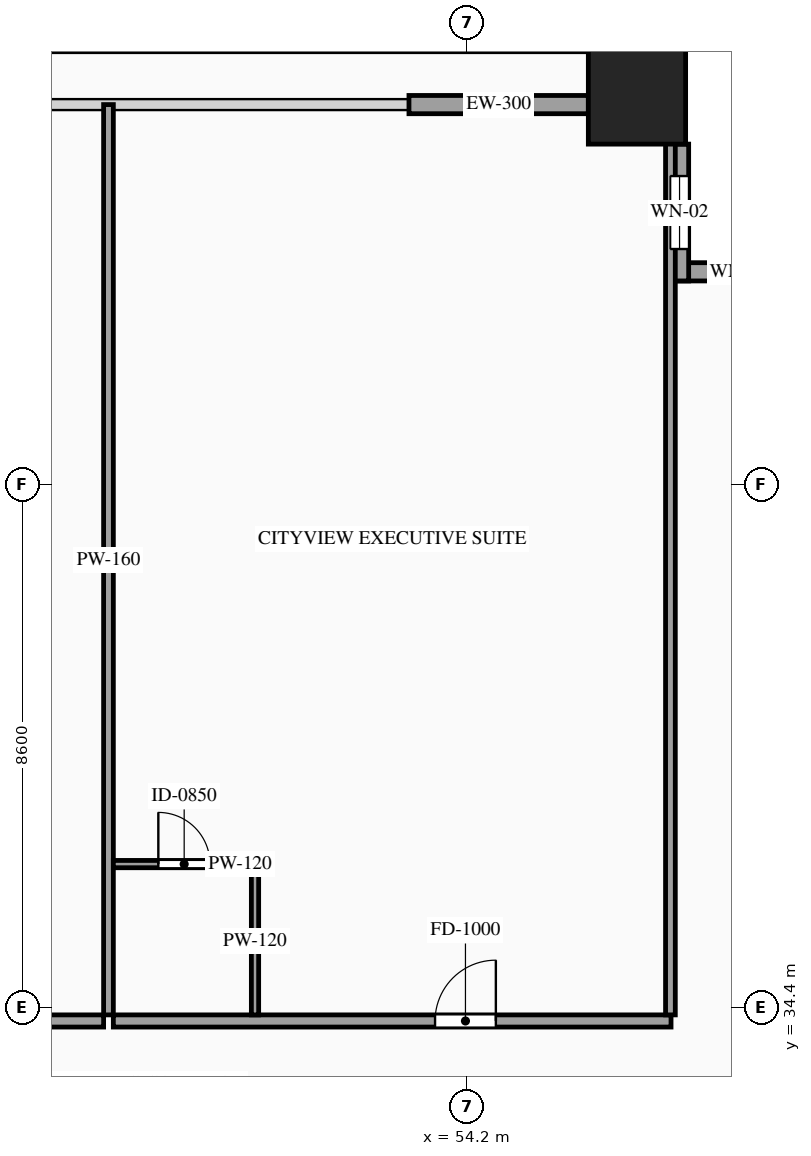
"""IFC4 building model, lengths in metres.
Left out: names, types, materials, properties, quantities, classifications, styles, units other than length and angle.
Written with IfcOpenShell. Run it as: python <this file> out.ifc"""

import sys

from ifc_helpers import new_model, si_unit, direction, frame, frame_2d, origin, origin_2d, place, context, subcontext, project, spatial, rectangle, hollow_rectangle, extrude, source, transform, mapped, element, fill, save


model = new_model("IFC4")
c1 = context("Model", 3, precision=1e-05, world=origin(), true_north=direction((0.0, 1.0)))
c2 = subcontext(c1, "Body", "Model", "MODEL_VIEW")
j1 = project(units=[si_unit("LENGTHUNIT", "METRE"), si_unit("PLANEANGLEUNIT", "RADIAN")], contexts=[c1])
p1 = place(None, origin())
s1 = spatial("IfcSite", under=j1, at=p1, CompositionType="ELEMENT")
p2 = place(p1, origin())
s2 = spatial("IfcBuilding", under=s1, at=p2, CompositionType="ELEMENT")
p3 = place(p2, frame((0.0, 0.0, 101.0)))
s3 = spatial("IfcBuildingStorey", under=s2, at=p3, CompositionType="ELEMENT", Elevation=101.0)
m1 = source(origin(), c2, "Body", "SweptSolid", [
    extrude(hollow_rectangle(XDim=1.6, YDim=1.6, WallThickness=0.07, at=origin_2d()), origin(), (0.0, 0.0, 1.0), 3.6),
])
p4 = place(p3, frame((57.0, 49.4, 0.0), z_axis=(0.0, 0.0, 1.0), x_axis=(1.0, 0.0, 0.0)))
e1 = element("IfcColumn", 1, at=p4, inside=s3, PredefinedType="COLUMN", context=c2, shape_type="MappedRepresentation", body=[
    mapped(m1, transform((0.0, 0.0, 0.0), scale=1.0)),
])
p5 = place(p3, frame((59.8, 46.5, 0.0), z_axis=(0.0, 0.0, 1.0), x_axis=(-1.0, 0.0, 0.0)))
e2 = element("IfcWall", 2, at=p5, inside=s3, PredefinedType="SOLIDWALL", context=c2, shape_type="SweptSolid", body=[
    extrude(rectangle(XDim=2.25, YDim=0.3, at=frame_2d((1.125, 0.0))), origin(), (0.0, 0.0, 1.0), 3.38),
])
p6 = place(p5, frame((0.675, 0.0, 0.85)))
e3 = element("IfcOpeningElement", 3, at=p6, cuts=e2, PredefinedType="OPENING", context=c2, shape_type="SweptSolid", body=[
    extrude(rectangle(XDim=0.9, YDim=1.5, at=frame_2d((0.45, 0.75))), frame((0.0, 0.165, 0.0), z_axis=(0.0, -1.0, 0.0), x_axis=(1.0, 0.0, 0.0)), (0.0, 0.0, 1.0), 0.33),
])
p7 = place(p3, frame((57.7, 46.35, 0.0), z_axis=(0.0, 0.0, 1.0), x_axis=(0.0, 1.0, 0.0)))
e4 = element("IfcWall", 4, at=p7, inside=s3, PredefinedType="SOLIDWALL", context=c2, shape_type="SweptSolid", body=[
    extrude(rectangle(XDim=2.25, YDim=0.3, at=frame_2d((1.125, 0.0))), origin(), (0.0, 0.0, 1.0), 3.38),
])
p8 = place(p7, frame((0.525, 0.0, 0.85)))
e5 = element("IfcOpeningElement", 5, at=p8, cuts=e4, PredefinedType="OPENING", context=c2, shape_type="SweptSolid", body=[
    extrude(rectangle(XDim=1.2, YDim=2.1, at=frame_2d((0.6, 1.05))), frame((0.0, 0.165, 0.0), z_axis=(0.0, -1.0, 0.0), x_axis=(1.0, 0.0, 0.0)), (0.0, 0.0, 1.0), 0.33),
])
m2 = source(origin(), c2, "Body", "SweptSolid", [
    extrude(rectangle(XDim=2.95, YDim=0.3, at=frame_2d((1.475, 0.0))), origin(), (0.0, 0.0, 1.0), 2.775),
])
p9 = place(p3, frame((53.25, 49.25, 0.0), z_axis=(0.0, 0.0, 1.0), x_axis=(1.0, 0.0, 0.0)))
e6 = element("IfcWall", 6, at=p9, inside=s3, PredefinedType="SOLIDWALL", context=c2, shape_type="MappedRepresentation", body=[
    mapped(m2, transform((0.0, 0.0, 0.0), scale=1.0)),
])
p10 = place(p3, frame((37.08, 34.18, 0.0), z_axis=(0.0, 0.0, 1.0), x_axis=(1.0, 0.0, 0.0)))
e7 = element("IfcWall", 7, at=p10, inside=s3, PredefinedType="PARTITIONING", context=c2, shape_type="SweptSolid", body=[
    extrude(rectangle(XDim=11.148, YDim=0.2, at=frame_2d((5.574, 0.0))), origin(), (0.0, 0.0, 1.0), 3.38),
])
p11 = place(p10, frame((5.074, 0.0, 0.0)))
e8 = element("IfcOpeningElement", 8, at=p11, cuts=e7, PredefinedType="OPENING", context=c2, shape_type="SweptSolid", body=[
    extrude(rectangle(XDim=1.0, YDim=2.2, at=frame_2d((0.5, 1.1))), frame((0.0, 0.115, 0.0), z_axis=(0.0, -1.0, 0.0), x_axis=(1.0, 0.0, 0.0)), (0.0, 0.0, 1.0), 0.23),
])
m3 = source(origin(), c2, "Body", "SweptSolid", [
    extrude(rectangle(XDim=14.97, YDim=0.16, at=frame_2d((7.485, 0.0))), origin(), (0.0, 0.0, 1.0), 3.38),
])
p12 = place(p3, frame((48.308, 34.28, 0.0), z_axis=(0.0, 0.0, 1.0), x_axis=(0.0, 1.0, 0.0)))
e9 = element("IfcWall", 9, at=p12, inside=s3, PredefinedType="PARTITIONING", context=c2, shape_type="MappedRepresentation", body=[
    mapped(m3, transform((0.0, 0.0, 0.0), scale=1.0)),
])
p13 = place(p3, frame((48.388, 34.18, 0.0), z_axis=(0.0, 0.0, 1.0), x_axis=(1.0, 0.0, 0.0)))
e10 = element("IfcWall", 10, at=p13, inside=s3, PredefinedType="PARTITIONING", context=c2, shape_type="SweptSolid", body=[
    extrude(rectangle(XDim=9.172, YDim=0.2, at=frame_2d((4.586, 0.0))), origin(), (0.0, 0.0, 1.0), 3.38),
])
p14 = place(p13, frame((5.291, 0.0, 0.0)))
e11 = element("IfcOpeningElement", 11, at=p14, cuts=e10, PredefinedType="OPENING", context=c2, shape_type="SweptSolid", body=[
    extrude(rectangle(XDim=1.0, YDim=2.2, at=frame_2d((0.5, 1.1))), frame((0.0, 0.115, 0.0), z_axis=(0.0, -1.0, 0.0), x_axis=(1.0, 0.0, 0.0)), (0.0, 0.0, 1.0), 0.23),
])
m4 = source(origin(), c2, "Body", "SweptSolid", [
    extrude(rectangle(XDim=14.82, YDim=0.16, at=frame_2d((7.41, 0.0))), origin(), (0.0, 0.0, 1.0), 3.38),
])
p15 = place(p3, frame((57.55, 34.28, 0.0), z_axis=(0.0, 0.0, 1.0), x_axis=(0.0, 1.0, 0.0)))
e12 = element("IfcWall", 12, at=p15, inside=s3, PredefinedType="PARTITIONING", context=c2, shape_type="MappedRepresentation", body=[
    mapped(m4, transform((0.0, 0.0, 0.0), scale=1.0)),
])
p16 = place(p3, frame((48.388, 36.76, 0.0), z_axis=(0.0, 0.0, 1.0), x_axis=(1.0, 0.0, 0.0)))
e13 = element("IfcWall", 13, at=p16, inside=s3, PredefinedType="PARTITIONING", context=c2, shape_type="SweptSolid", body=[
    extrude(rectangle(XDim=2.33, YDim=0.12, at=frame_2d((1.165, 0.0))), origin(), (0.0, 0.0, 1.0), 3.38),
])
p17 = place(p16, frame((0.74, 0.0, 0.0)))
e14 = element("IfcOpeningElement", 14, at=p17, cuts=e13, PredefinedType="OPENING", context=c2, shape_type="SweptSolid", body=[
    extrude(rectangle(XDim=0.85, YDim=2.1, at=frame_2d((0.425, 1.05))), frame((0.0, 0.075, 0.0), z_axis=(0.0, -1.0, 0.0), x_axis=(1.0, 0.0, 0.0)), (0.0, 0.0, 1.0), 0.15),
])
m5 = source(origin(), c2, "Body", "SweptSolid", [
    extrude(rectangle(XDim=2.42, YDim=0.12, at=frame_2d((1.21, 0.0))), origin(), (0.0, 0.0, 1.0), 3.38),
])
p18 = place(p3, frame((50.718, 34.28, 0.0), z_axis=(0.0, 0.0, 1.0), x_axis=(0.0, 1.0, 0.0)))
e15 = element("IfcWall", 15, at=p18, inside=s3, PredefinedType="PARTITIONING", context=c2, shape_type="MappedRepresentation", body=[
    mapped(m5, transform((0.0, 0.0, 0.0), scale=1.0)),
])
m6 = source(origin(), c2, "Body", "SweptSolid", [
    extrude(rectangle(XDim=0.9, YDim=1.5, at=frame_2d((0.45, 0.75))), frame((0.0, 0.03, 0.0), z_axis=(0.0, -1.0, 0.0), x_axis=(1.0, 0.0, 0.0)), (0.0, 0.0, 1.0), 0.06),
])
p19 = place(p6, origin())
e16 = element("IfcWindow", 16, at=p19, inside=s3, PartitioningType="SINGLE_PANEL", PredefinedType="WINDOW", context=c2, shape_type="MappedRepresentation", body=[
    mapped(m6, transform((0.0, 0.0, 0.0), scale=1.0)),
])
fill(e3, e16)
m7 = source(origin(), c2, "Body", "SweptSolid", [
    extrude(rectangle(XDim=1.2, YDim=2.1, at=frame_2d((0.6, 1.05))), frame((0.0, 0.03, 0.0), z_axis=(0.0, -1.0, 0.0), x_axis=(1.0, 0.0, 0.0)), (0.0, 0.0, 1.0), 0.06),
])
p20 = place(p8, origin())
e17 = element("IfcWindow", 17, at=p20, inside=s3, PartitioningType="SINGLE_PANEL", PredefinedType="WINDOW", context=c2, shape_type="MappedRepresentation", body=[
    mapped(m7, transform((0.0, 0.0, 0.0), scale=1.0)),
])
fill(e5, e17)
m8 = source(origin(), c2, "Body", "SweptSolid", [
    extrude(rectangle(XDim=1.0, YDim=2.2, at=frame_2d((0.5, 1.1))), frame((0.0, 0.025, 0.0), z_axis=(0.0, -1.0, 0.0), x_axis=(1.0, 0.0, 0.0)), (0.0, 0.0, 1.0), 0.05),
])
p21 = place(p14, origin())
e18 = element("IfcDoor", 18, at=p21, inside=s3, OperationType="SINGLE_SWING_RIGHT", PredefinedType="DOOR", context=c2, shape_type="MappedRepresentation", body=[
    mapped(m8, transform((0.0, 0.0, 0.0), scale=1.0)),
])
fill(e11, e18)
m9 = source(origin(), c2, "Body", "SweptSolid", [
    extrude(rectangle(XDim=0.85, YDim=2.1, at=frame_2d((0.425, 1.05))), frame((0.0, 0.025, 0.0), z_axis=(0.0, -1.0, 0.0), x_axis=(1.0, 0.0, 0.0)), (0.0, 0.0, 1.0), 0.05),
])
p22 = place(p17, origin())
e19 = element("IfcDoor", 19, at=p22, inside=s3, OperationType="SINGLE_SWING_LEFT", PredefinedType="DOOR", context=c2, shape_type="MappedRepresentation", body=[
    mapped(m9, transform((0.0, 0.0, 0.0), scale=1.0)),
])
fill(e14, e19)
save(model, sys.argv[1])
